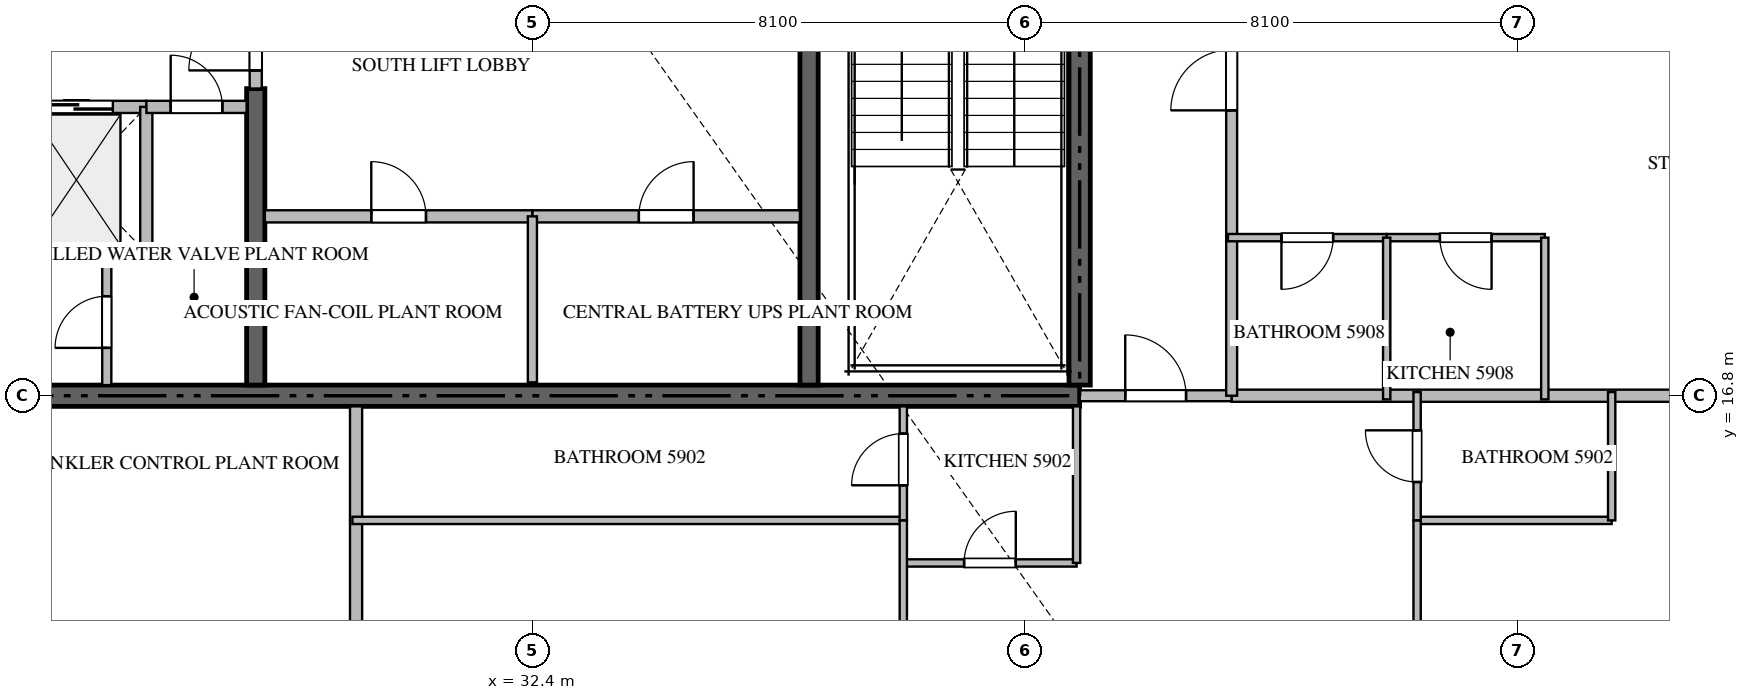
"""IFC4 building model, lengths in metres.
Left out: names, types, materials, properties, quantities, classifications, styles, units other than length and angle.
Written with IfcOpenShell. Run it as: python <this file> out.ifc"""

import sys

from ifc_helpers import new_model, si_unit, direction, frame, frame_2d, origin, place, context, subcontext, project, spatial, rectangle, extrude, source, transform, mapped, element, fill, save


model = new_model("IFC4")
c1 = context("Model", 3, precision=1e-05, world=origin(), true_north=direction((0.0, 1.0)))
c2 = subcontext(c1, "Body", "Model", "MODEL_VIEW")
j1 = project(units=[si_unit("LENGTHUNIT", "METRE"), si_unit("PLANEANGLEUNIT", "RADIAN")], contexts=[c1])
p1 = place(None, origin())
s1 = spatial("IfcSite", under=j1, at=p1, CompositionType="ELEMENT")
p2 = place(p1, origin())
s2 = spatial("IfcBuilding", under=s1, at=p2, CompositionType="ELEMENT")
p3 = place(p2, frame((0.0, 0.0, 237.4)))
s3 = spatial("IfcBuildingStorey", under=s2, at=p3, CompositionType="ELEMENT", Elevation=237.4)
p4 = place(p3, frame((23.4, 16.8, -0.26), z_axis=(0.0, 0.0, 1.0), x_axis=(1.0, 0.0, 0.0)))
e1 = element("IfcWall", 1, at=p4, inside=s3, PredefinedType="SHEAR", context=c2, shape_type="SweptSolid", body=[
    extrude(rectangle(XDim=18.0, YDim=0.35, at=frame_2d((9.0, 0.0))), origin(), (0.0, 0.0, 1.0), 3.848),
])
p5 = place(p3, frame((41.4, 16.975, -0.26), z_axis=(0.0, 0.0, 1.0), x_axis=(0.0, 1.0, 0.0)))
e2 = element("IfcWall", 2, at=p5, inside=s3, PredefinedType="SHEAR", context=c2, shape_type="SweptSolid", body=[
    extrude(rectangle(XDim=8.375, YDim=0.35, at=frame_2d((4.188, 0.0))), origin(), (0.0, 0.0, 1.0), 3.848),
])
p6 = place(p3, frame((27.85, 16.975, -0.26), z_axis=(0.0, 0.0, 1.0), x_axis=(0.0, 1.0, 0.0)))
e3 = element("IfcWall", 3, at=p6, inside=s3, PredefinedType="SHEAR", context=c2, shape_type="SweptSolid", body=[
    extrude(rectangle(XDim=4.875, YDim=0.3, at=frame_2d((2.438, 0.0))), origin(), (0.0, 0.0, 1.0), 3.848),
])
p7 = place(p3, frame((36.95, 16.975, -0.26), z_axis=(0.0, 0.0, 1.0), x_axis=(0.0, 1.0, 0.0)))
e4 = element("IfcWall", 4, at=p7, inside=s3, PredefinedType="SHEAR", context=c2, shape_type="SweptSolid", body=[
    extrude(rectangle(XDim=8.375, YDim=0.3, at=frame_2d((4.188, 0.0))), origin(), (0.0, 0.0, 1.0), 3.848),
])
p8 = place(p3, frame((23.575, 21.55, 0.0), z_axis=(0.0, 0.0, 1.0), x_axis=(1.0, 0.0, 0.0)))
e5 = element("IfcWall", 5, at=p8, inside=s3, PredefinedType="STANDARD", context=c2, shape_type="SweptSolid", body=[
    extrude(rectangle(XDim=2.475, YDim=0.2, at=frame_2d((1.238, 0.0))), origin(), (0.0, 0.0, 1.0), 3.59),
])
p9 = place(p8, frame((0.725, 0.0, 0.0)))
e6 = element("IfcOpeningElement", 6, at=p9, cuts=e5, PredefinedType="OPENING", context=c2, shape_type="SweptSolid", body=[
    extrude(rectangle(XDim=1.2, YDim=2.2, at=frame_2d((0.6, 1.1))), frame((0.0, 0.11, 0.0), z_axis=(0.0, -1.0, 0.0), x_axis=(1.0, 0.0, 0.0)), (0.0, 0.0, 1.0), 0.22),
])
p10 = place(p3, frame((26.05, 19.05, 0.0), z_axis=(0.0, 0.0, 1.0), x_axis=(0.0, 1.0, 0.0)))
e7 = element("IfcWall", 7, at=p10, inside=s3, PredefinedType="STANDARD", context=c2, shape_type="SweptSolid", body=[
    extrude(rectangle(XDim=2.5, YDim=0.2, at=frame_2d((1.25, 0.0))), origin(), (0.0, 0.0, 1.0), 3.59),
])
p11 = place(p3, frame((23.575, 19.05, 0.0), z_axis=(0.0, 0.0, 1.0), x_axis=(1.0, 0.0, 0.0)))
e8 = element("IfcWall", 8, at=p11, inside=s3, PredefinedType="STANDARD", context=c2, shape_type="SweptSolid", body=[
    extrude(rectangle(XDim=2.475, YDim=0.2, at=frame_2d((1.238, 0.0))), origin(), (0.0, 0.0, 1.0), 3.59),
])
p12 = place(p3, frame((26.052, 21.55, 0.0), z_axis=(0.0, 0.0, 1.0), x_axis=(1.0, 0.0, 0.0)))
e9 = element("IfcWall", 9, at=p12, inside=s3, PredefinedType="STANDARD", context=c2, shape_type="SweptSolid", body=[
    extrude(rectangle(XDim=1.648, YDim=0.2, at=frame_2d((0.824, 0.0))), origin(), (0.0, 0.0, 1.0), 3.59),
])
p13 = place(p12, frame((0.399, 0.0, 0.0)))
e10 = element("IfcOpeningElement", 10, at=p13, cuts=e9, PredefinedType="OPENING", context=c2, shape_type="SweptSolid", body=[
    extrude(rectangle(XDim=0.85, YDim=2.1, at=frame_2d((0.425, 1.05))), frame((0.0, 0.11, 0.0), z_axis=(0.0, -1.0, 0.0), x_axis=(1.0, 0.0, 0.0)), (0.0, 0.0, 1.0), 0.22),
])
p14 = place(p3, frame((27.85, 21.852, 0.0), z_axis=(0.0, 0.0, 1.0), x_axis=(0.0, 1.0, 0.0)))
e11 = element("IfcWall", 11, at=p14, inside=s3, PredefinedType="STANDARD", context=c2, shape_type="SweptSolid", body=[
    extrude(rectangle(XDim=1.696, YDim=0.2, at=frame_2d((0.848, 0.0))), origin(), (0.0, 0.0, 1.0), 3.59),
])
p15 = place(p14, frame((0.298, 0.0, 0.0)))
e12 = element("IfcOpeningElement", 12, at=p15, cuts=e11, PredefinedType="OPENING", context=c2, shape_type="SweptSolid", body=[
    extrude(rectangle(XDim=1.1, YDim=2.15, at=frame_2d((0.55, 1.075))), frame((0.0, 0.11, 0.0), z_axis=(0.0, -1.0, 0.0), x_axis=(1.0, 0.0, 0.0)), (0.0, 0.0, 1.0), 0.22),
])
p16 = place(p3, frame((25.4, 16.975, 0.0), z_axis=(0.0, 0.0, 1.0), x_axis=(0.0, 1.0, 0.0)))
e13 = element("IfcWall", 13, at=p16, inside=s3, PredefinedType="PARTITIONING", context=c2, shape_type="SweptSolid", body=[
    extrude(rectangle(XDim=2.075, YDim=0.15, at=frame_2d((1.038, 0.0))), origin(), (0.0, 0.0, 1.0), 3.59),
])
p17 = place(p16, frame((0.612, 0.0, 0.0)))
e14 = element("IfcOpeningElement", 14, at=p17, cuts=e13, PredefinedType="OPENING", context=c2, shape_type="SweptSolid", body=[
    extrude(rectangle(XDim=0.85, YDim=2.1, at=frame_2d((0.425, 1.05))), frame((0.0, 0.085, 0.0), z_axis=(0.0, -1.0, 0.0), x_axis=(1.0, 0.0, 0.0)), (0.0, 0.0, 1.0), 0.17),
])
p18 = place(p3, frame((28.0, 19.75, 0.0), z_axis=(0.0, 0.0, 1.0), x_axis=(1.0, 0.0, 0.0)))
e15 = element("IfcWall", 15, at=p18, inside=s3, PredefinedType="STANDARD", context=c2, shape_type="SweptSolid", body=[
    extrude(rectangle(XDim=4.4, YDim=0.2, at=frame_2d((2.2, 0.0))), origin(), (0.0, 0.0, 1.0), 3.59),
])
p19 = place(p18, frame((1.75, 0.0, 0.0)))
e16 = element("IfcOpeningElement", 16, at=p19, cuts=e15, PredefinedType="OPENING", context=c2, shape_type="SweptSolid", body=[
    extrude(rectangle(XDim=0.9, YDim=2.1, at=frame_2d((0.45, 1.05))), frame((0.0, 0.11, 0.0), z_axis=(0.0, -1.0, 0.0), x_axis=(1.0, 0.0, 0.0)), (0.0, 0.0, 1.0), 0.22),
])
p20 = place(p3, frame((32.402, 19.75, 0.0), z_axis=(0.0, 0.0, 1.0), x_axis=(1.0, 0.0, 0.0)))
e17 = element("IfcWall", 17, at=p20, inside=s3, PredefinedType="STANDARD", context=c2, shape_type="SweptSolid", body=[
    extrude(rectangle(XDim=4.398, YDim=0.2, at=frame_2d((2.199, 0.0))), origin(), (0.0, 0.0, 1.0), 3.59),
])
p21 = place(p20, frame((1.749, 0.0, 0.0)))
e18 = element("IfcOpeningElement", 18, at=p21, cuts=e17, PredefinedType="OPENING", context=c2, shape_type="SweptSolid", body=[
    extrude(rectangle(XDim=0.9, YDim=2.1, at=frame_2d((0.45, 1.05))), frame((0.0, 0.11, 0.0), z_axis=(0.0, -1.0, 0.0), x_axis=(1.0, 0.0, 0.0)), (0.0, 0.0, 1.0), 0.22),
])
p22 = place(p3, frame((32.4, 17.02, 0.0), z_axis=(0.0, 0.0, 1.0), x_axis=(0.0, 1.0, 0.0)))
e19 = element("IfcWall", 19, at=p22, inside=s3, PredefinedType="PARTITIONING", context=c2, shape_type="SweptSolid", body=[
    extrude(rectangle(XDim=2.73, YDim=0.15, at=frame_2d((1.365, 0.0))), origin(), (0.0, 0.0, 1.0), 3.59),
])
p23 = place(p3, frame((29.5, 1.282, 0.0), z_axis=(0.0, 0.0, 1.0), x_axis=(0.0, 1.0, 0.0)))
e20 = element("IfcWall", 20, at=p23, inside=s3, PredefinedType="PARTITIONING", context=c2, shape_type="SweptSolid", body=[
    extrude(rectangle(XDim=15.343, YDim=0.2, at=frame_2d((7.671, 0.0))), origin(), (0.0, 0.0, 1.0), 3.59),
])
p24 = place(p3, frame((43.9, 16.8, 0.0), z_axis=(0.0, 0.0, 1.0), x_axis=(1.0, 0.0, 0.0)))
e21 = element("IfcWall", 21, at=p24, inside=s3, PredefinedType="PARTITIONING", context=c2, shape_type="SweptSolid", body=[
    extrude(rectangle(XDim=13.418, YDim=0.2, at=frame_2d((6.709, 0.0))), origin(), (0.0, 0.0, 1.0), 3.59),
])
p25 = place(p3, frame((41.402, 16.8, 0.0), z_axis=(0.0, 0.0, 1.0), x_axis=(1.0, 0.0, 0.0)))
e22 = element("IfcWall", 22, at=p25, inside=s3, PredefinedType="PARTITIONING", context=c2, shape_type="SweptSolid", body=[
    extrude(rectangle(XDim=2.496, YDim=0.18, at=frame_2d((1.248, 0.0))), origin(), (0.0, 0.0, 1.0), 3.59),
])
p26 = place(p25, frame((0.748, 0.0, 0.0)))
e23 = element("IfcOpeningElement", 23, at=p26, cuts=e22, PredefinedType="OPENING", context=c2, shape_type="SweptSolid", body=[
    extrude(rectangle(XDim=1.0, YDim=2.15, at=frame_2d((0.5, 1.075))), frame((0.0, 0.1, 0.0), z_axis=(0.0, -1.0, 0.0), x_axis=(1.0, 0.0, 0.0)), (0.0, 0.0, 1.0), 0.2),
])
p27 = place(p3, frame((43.9, 16.8, 0.0), z_axis=(0.0, 0.0, 1.0), x_axis=(0.0, 1.0, 0.0)))
e24 = element("IfcWall", 24, at=p27, inside=s3, PredefinedType="PARTITIONING", context=c2, shape_type="SweptSolid", body=[
    extrude(rectangle(XDim=16.8, YDim=0.18, at=frame_2d((8.4, 0.0))), origin(), (0.0, 0.0, 1.0), 3.59),
])
p28 = place(p27, frame((4.693, 0.0, 0.0)))
e25 = element("IfcOpeningElement", 25, at=p28, cuts=e24, PredefinedType="OPENING", context=c2, shape_type="SweptSolid", body=[
    extrude(rectangle(XDim=1.0, YDim=2.15, at=frame_2d((0.5, 1.075))), frame((0.0, 0.1, 0.0), z_axis=(0.0, -1.0, 0.0), x_axis=(1.0, 0.0, 0.0)), (0.0, 0.0, 1.0), 0.2),
])
p29 = place(p27, frame((13.13, 0.0, 0.0)))
e26 = element("IfcOpeningElement", 26, at=p29, cuts=e24, PredefinedType="OPENING", context=c2, shape_type="SweptSolid", body=[
    extrude(rectangle(XDim=1.0, YDim=2.15, at=frame_2d((0.5, 1.075))), frame((0.0, 0.1, 0.0), z_axis=(0.0, -1.0, 0.0), x_axis=(1.0, 0.0, 0.0)), (0.0, 0.0, 1.0), 0.2),
])
p30 = place(p3, frame((38.5, 14.05, 0.0), z_axis=(0.0, 0.0, 1.0), x_axis=(1.0, 0.0, 0.0)))
e27 = element("IfcWall", 27, at=p30, inside=s3, PredefinedType="PARTITIONING", context=c2, shape_type="SweptSolid", body=[
    extrude(rectangle(XDim=2.85, YDim=0.12, at=frame_2d((1.425, 0.0))), origin(), (0.0, 0.0, 1.0), 3.59),
])
p31 = place(p30, frame((1.0, 0.0, 0.0)))
e28 = element("IfcOpeningElement", 28, at=p31, cuts=e27, PredefinedType="OPENING", context=c2, shape_type="SweptSolid", body=[
    extrude(rectangle(XDim=0.85, YDim=2.1, at=frame_2d((0.425, 1.05))), frame((0.0, 0.07, 0.0), z_axis=(0.0, -1.0, 0.0), x_axis=(1.0, 0.0, 0.0)), (0.0, 0.0, 1.0), 0.14),
])
p32 = place(p3, frame((41.35, 14.05, 0.0), z_axis=(0.0, 0.0, 1.0), x_axis=(0.0, 1.0, 0.0)))
e29 = element("IfcWall", 29, at=p32, inside=s3, PredefinedType="PARTITIONING", context=c2, shape_type="SweptSolid", body=[
    extrude(rectangle(XDim=2.575, YDim=0.12, at=frame_2d((1.288, 0.0))), origin(), (0.0, 0.0, 1.0), 3.59),
])
p33 = place(p3, frame((29.44, 14.75, 0.0), z_axis=(0.0, 0.0, 1.0), x_axis=(1.0, 0.0, 0.0)))
e30 = element("IfcWall", 30, at=p33, inside=s3, PredefinedType="PARTITIONING", context=c2, shape_type="SweptSolid", body=[
    extrude(rectangle(XDim=9.06, YDim=0.12, at=frame_2d((4.53, 0.0))), origin(), (0.0, 0.0, 1.0), 3.59),
])
p34 = place(p3, frame((38.5, 6.024, 0.0), z_axis=(0.0, 0.0, 1.0), x_axis=(0.0, 1.0, 0.0)))
e31 = element("IfcWall", 31, at=p34, inside=s3, PredefinedType="PARTITIONING", context=c2, shape_type="SweptSolid", body=[
    extrude(rectangle(XDim=8.726, YDim=0.12, at=frame_2d((4.363, 0.0))), origin(), (0.0, 0.0, 1.0), 3.59),
])
p35 = place(p34, frame((3.938, 0.0, 0.0)))
e32 = element("IfcOpeningElement", 32, at=p35, cuts=e31, PredefinedType="OPENING", context=c2, shape_type="SweptSolid", body=[
    extrude(rectangle(XDim=0.85, YDim=2.1, at=frame_2d((0.425, 1.05))), frame((0.0, 0.07, 0.0), z_axis=(0.0, -1.0, 0.0), x_axis=(1.0, 0.0, 0.0)), (0.0, 0.0, 1.0), 0.14),
])
p36 = place(p3, frame((38.5, 14.752, 0.0), z_axis=(0.0, 0.0, 1.0), x_axis=(0.0, 1.0, 0.0)))
e33 = element("IfcWall", 33, at=p36, inside=s3, PredefinedType="PARTITIONING", context=c2, shape_type="SweptSolid", body=[
    extrude(rectangle(XDim=1.873, YDim=0.12, at=frame_2d((0.937, 0.0))), origin(), (0.0, 0.0, 1.0), 3.59),
])
p37 = place(p36, frame((0.575, 0.0, 0.0)))
e34 = element("IfcOpeningElement", 34, at=p37, cuts=e33, PredefinedType="OPENING", context=c2, shape_type="SweptSolid", body=[
    extrude(rectangle(XDim=0.85, YDim=2.1, at=frame_2d((0.425, 1.05))), frame((0.0, 0.07, 0.0), z_axis=(0.0, -1.0, 0.0), x_axis=(1.0, 0.0, 0.0)), (0.0, 0.0, 1.0), 0.14),
])
p38 = place(p3, frame((46.95, 14.75, 0.0), z_axis=(0.0, 0.0, 1.0), x_axis=(1.0, 0.0, 0.0)))
e35 = element("IfcWall", 35, at=p38, inside=s3, PredefinedType="PARTITIONING", context=c2, shape_type="SweptSolid", body=[
    extrude(rectangle(XDim=3.2, YDim=0.12, at=frame_2d((1.6, 0.0))), origin(), (0.0, 0.0, 1.0), 3.59),
])
p39 = place(p3, frame((50.15, 14.75, 0.0), z_axis=(0.0, 0.0, 1.0), x_axis=(0.0, 1.0, 0.0)))
e36 = element("IfcWall", 36, at=p39, inside=s3, PredefinedType="PARTITIONING", context=c2, shape_type="SweptSolid", body=[
    extrude(rectangle(XDim=2.11, YDim=0.12, at=frame_2d((1.055, 0.0))), origin(), (0.0, 0.0, 1.0), 3.59),
])
p40 = place(p3, frame((46.95, 8.67, 0.0), z_axis=(0.0, 0.0, 1.0), x_axis=(0.0, 1.0, 0.0)))
e37 = element("IfcWall", 37, at=p40, inside=s3, PredefinedType="PARTITIONING", context=c2, shape_type="SweptSolid", body=[
    extrude(rectangle(XDim=6.08, YDim=0.12, at=frame_2d((3.04, 0.0))), origin(), (0.0, 0.0, 1.0), 3.59),
])
p41 = place(p40, frame((2.615, 0.0, 0.0)))
e38 = element("IfcOpeningElement", 38, at=p41, cuts=e37, PredefinedType="OPENING", context=c2, shape_type="SweptSolid", body=[
    extrude(rectangle(XDim=0.85, YDim=2.1, at=frame_2d((0.425, 1.05))), frame((0.0, 0.07, 0.0), z_axis=(0.0, -1.0, 0.0), x_axis=(1.0, 0.0, 0.0)), (0.0, 0.0, 1.0), 0.14),
])
p42 = place(p3, frame((46.95, 14.752, 0.0), z_axis=(0.0, 0.0, 1.0), x_axis=(0.0, 1.0, 0.0)))
e39 = element("IfcWall", 39, at=p42, inside=s3, PredefinedType="PARTITIONING", context=c2, shape_type="SweptSolid", body=[
    extrude(rectangle(XDim=2.108, YDim=0.12, at=frame_2d((1.054, 0.0))), origin(), (0.0, 0.0, 1.0), 3.59),
])
p43 = place(p42, frame((0.629, 0.0, 0.0)))
e40 = element("IfcOpeningElement", 40, at=p43, cuts=e39, PredefinedType="OPENING", context=c2, shape_type="SweptSolid", body=[
    extrude(rectangle(XDim=0.85, YDim=2.1, at=frame_2d((0.425, 1.05))), frame((0.0, 0.07, 0.0), z_axis=(0.0, -1.0, 0.0), x_axis=(1.0, 0.0, 0.0)), (0.0, 0.0, 1.0), 0.14),
])
p44 = place(p3, frame((49.05, 19.4, 0.0), z_axis=(0.0, 0.0, 1.0), x_axis=(-1.0, 0.0, 0.0)))
e41 = element("IfcWall", 41, at=p44, inside=s3, PredefinedType="PARTITIONING", context=c2, shape_type="SweptSolid", body=[
    extrude(rectangle(XDim=2.6, YDim=0.12, at=frame_2d((1.3, 0.0))), origin(), (0.0, 0.0, 1.0), 3.59),
])
p45 = place(p44, frame((0.875, 0.0, 0.0)))
e42 = element("IfcOpeningElement", 42, at=p45, cuts=e41, PredefinedType="OPENING", context=c2, shape_type="SweptSolid", body=[
    extrude(rectangle(XDim=0.85, YDim=2.1, at=frame_2d((0.425, 1.05))), frame((0.0, 0.07, 0.0), z_axis=(0.0, -1.0, 0.0), x_axis=(1.0, 0.0, 0.0)), (0.0, 0.0, 1.0), 0.14),
])
p46 = place(p3, frame((46.448, 19.4, 0.0), z_axis=(0.0, 0.0, 1.0), x_axis=(-1.0, 0.0, 0.0)))
e43 = element("IfcWall", 43, at=p46, inside=s3, PredefinedType="PARTITIONING", context=c2, shape_type="SweptSolid", body=[
    extrude(rectangle(XDim=2.608, YDim=0.12, at=frame_2d((1.304, 0.0))), origin(), (0.0, 0.0, 1.0), 3.59),
])
p47 = place(p46, frame((0.879, 0.0, 0.0)))
e44 = element("IfcOpeningElement", 44, at=p47, cuts=e43, PredefinedType="OPENING", context=c2, shape_type="SweptSolid", body=[
    extrude(rectangle(XDim=0.85, YDim=2.1, at=frame_2d((0.425, 1.05))), frame((0.0, 0.07, 0.0), z_axis=(0.0, -1.0, 0.0), x_axis=(1.0, 0.0, 0.0)), (0.0, 0.0, 1.0), 0.14),
])
for number, where, z_axis, x_axis in (
    (45, (46.45, 16.74, 0.0), (0.0, 0.0, 1.0), (0.0, 1.0, 0.0)),
    (46, (49.05, 16.74, 0.0), (0.0, 0.0, 1.0), (0.0, 1.0, 0.0)),
):
    element("IfcWall", number, at=place(p3, frame(where, z_axis=z_axis, x_axis=x_axis)), inside=s3, PredefinedType="PARTITIONING", context=c2, shape_type="SweptSolid", body=[
        extrude(rectangle(XDim=2.66, YDim=0.12, at=frame_2d((1.33, 0.0))), origin(), (0.0, 0.0, 1.0), 3.59),
    ])
m1 = source(origin(), c2, "Body", "SweptSolid", [
    extrude(rectangle(XDim=1.2, YDim=2.2, at=frame_2d((0.6, 1.1))), frame((0.0, 0.025, 0.0), z_axis=(0.0, -1.0, 0.0), x_axis=(1.0, 0.0, 0.0)), (0.0, 0.0, 1.0), 0.05),
])
p48 = place(p9, origin())
e47 = element("IfcDoor", 47, at=p48, inside=s3, OperationType="DOUBLE_DOOR_SLIDING", PredefinedType="DOOR", context=c2, shape_type="MappedRepresentation", body=[
    mapped(m1, transform((0.0, 0.0, 0.0), scale=1.0)),
])
fill(e6, e47)
m2 = source(origin(), c2, "Body", "SweptSolid", [
    extrude(rectangle(XDim=0.85, YDim=2.1, at=frame_2d((0.425, 1.05))), frame((0.0, 0.025, 0.0), z_axis=(0.0, -1.0, 0.0), x_axis=(1.0, 0.0, 0.0)), (0.0, 0.0, 1.0), 0.05),
])
p49 = place(p13, origin())
e48 = element("IfcDoor", 48, at=p49, inside=s3, OperationType="SINGLE_SWING_LEFT", PredefinedType="DOOR", context=c2, shape_type="MappedRepresentation", body=[
    mapped(m2, transform((0.0, 0.0, 0.0), scale=1.0)),
])
fill(e10, e48)
m3 = source(origin(), c2, "Body", "SweptSolid", [
    extrude(rectangle(XDim=1.1, YDim=2.15, at=frame_2d((0.55, 1.075))), frame((0.0, 0.025, 0.0), z_axis=(0.0, -1.0, 0.0), x_axis=(1.0, 0.0, 0.0)), (0.0, 0.0, 1.0), 0.05),
])
p50 = place(p15, origin())
e49 = element("IfcDoor", 49, at=p50, inside=s3, OperationType="SINGLE_SWING_LEFT", PredefinedType="DOOR", context=c2, shape_type="MappedRepresentation", body=[
    mapped(m3, transform((0.0, 0.0, 0.0), scale=1.0)),
])
fill(e12, e49)
p51 = place(p17, origin())
e50 = element("IfcDoor", 50, at=p51, inside=s3, OperationType="SINGLE_SWING_LEFT", PredefinedType="DOOR", context=c2, shape_type="MappedRepresentation", body=[
    mapped(m2, transform((0.0, 0.0, 0.0), scale=1.0)),
])
fill(e14, e50)
m4 = source(origin(), c2, "Body", "SweptSolid", [
    extrude(rectangle(XDim=0.9, YDim=2.1, at=frame_2d((0.45, 1.05))), frame((0.0, 0.025, 0.0), z_axis=(0.0, -1.0, 0.0), x_axis=(1.0, 0.0, 0.0)), (0.0, 0.0, 1.0), 0.05),
])
p52 = place(p19, origin())
e51 = element("IfcDoor", 51, at=p52, inside=s3, OperationType="SINGLE_SWING_LEFT", PredefinedType="DOOR", context=c2, shape_type="MappedRepresentation", body=[
    mapped(m4, transform((0.0, 0.0, 0.0), scale=1.0)),
])
fill(e16, e51)
p53 = place(p21, origin())
e52 = element("IfcDoor", 52, at=p53, inside=s3, OperationType="SINGLE_SWING_RIGHT", PredefinedType="DOOR", context=c2, shape_type="MappedRepresentation", body=[
    mapped(m4, transform((0.0, 0.0, 0.0), scale=1.0)),
])
fill(e18, e52)
m5 = source(origin(), c2, "Body", "SweptSolid", [
    extrude(rectangle(XDim=1.0, YDim=2.15, at=frame_2d((0.5, 1.075))), frame((0.0, 0.025, 0.0), z_axis=(0.0, -1.0, 0.0), x_axis=(1.0, 0.0, 0.0)), (0.0, 0.0, 1.0), 0.05),
])
p54 = place(p26, origin())
e53 = element("IfcDoor", 53, at=p54, inside=s3, OperationType="SINGLE_SWING_LEFT", PredefinedType="DOOR", context=c2, shape_type="MappedRepresentation", body=[
    mapped(m5, transform((0.0, 0.0, 0.0), scale=1.0)),
])
fill(e23, e53)
p55 = place(p28, origin())
e54 = element("IfcDoor", 54, at=p55, inside=s3, OperationType="SINGLE_SWING_LEFT", PredefinedType="DOOR", context=c2, shape_type="MappedRepresentation", body=[
    mapped(m5, transform((0.0, 0.0, 0.0), scale=1.0)),
])
fill(e25, e54)
p56 = place(p31, origin())
e55 = element("IfcDoor", 55, at=p56, inside=s3, OperationType="SINGLE_SWING_RIGHT", PredefinedType="DOOR", context=c2, shape_type="MappedRepresentation", body=[
    mapped(m2, transform((0.0, 0.0, 0.0), scale=1.0)),
])
fill(e28, e55)
p57 = place(p37, origin())
e56 = element("IfcDoor", 56, at=p57, inside=s3, OperationType="SINGLE_SWING_LEFT", PredefinedType="DOOR", context=c2, shape_type="MappedRepresentation", body=[
    mapped(m2, transform((0.0, 0.0, 0.0), scale=1.0)),
])
fill(e34, e56)
p58 = place(p43, origin())
e57 = element("IfcDoor", 57, at=p58, inside=s3, OperationType="SINGLE_SWING_RIGHT", PredefinedType="DOOR", context=c2, shape_type="MappedRepresentation", body=[
    mapped(m2, transform((0.0, 0.0, 0.0), scale=1.0)),
])
fill(e40, e57)
p59 = place(p45, origin())
e58 = element("IfcDoor", 58, at=p59, inside=s3, OperationType="SINGLE_SWING_LEFT", PredefinedType="DOOR", context=c2, shape_type="MappedRepresentation", body=[
    mapped(m2, transform((0.0, 0.0, 0.0), scale=1.0)),
])
fill(e42, e58)
p60 = place(p47, origin())
e59 = element("IfcDoor", 59, at=p60, inside=s3, OperationType="SINGLE_SWING_RIGHT", PredefinedType="DOOR", context=c2, shape_type="MappedRepresentation", body=[
    mapped(m2, transform((0.0, 0.0, 0.0), scale=1.0)),
])
fill(e44, e59)
save(model, sys.argv[1])
